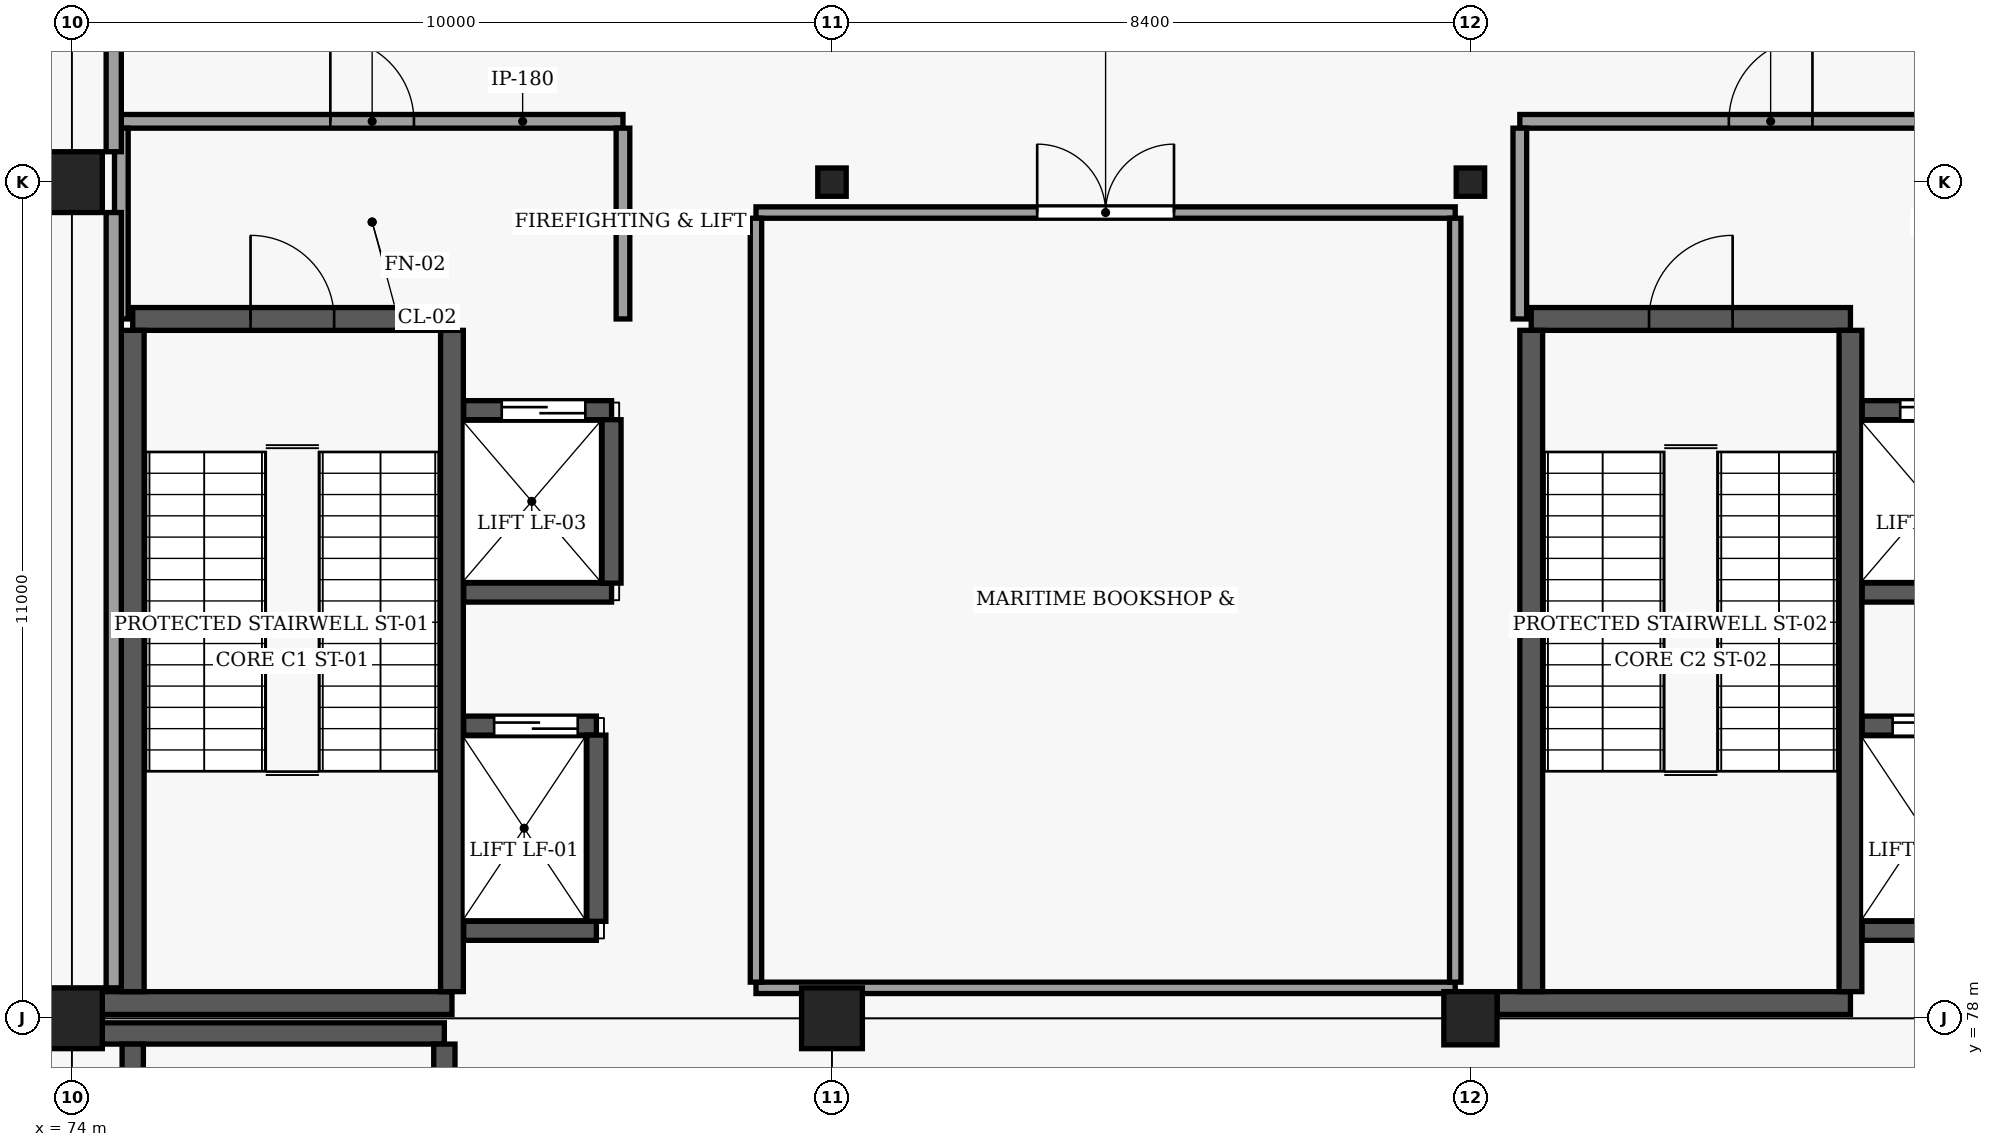
"""IFC4 building model, lengths in metres.
Left out: names, types, materials, properties, quantities, classifications, styles, units other than length and angle.
Written with IfcOpenShell. Run it as: python <this file> out.ifc"""

import sys

from ifc_helpers import new_model, si_unit, direction, frame, frame_2d, origin, origin_2d, place, context, subcontext, project, spatial, rectangle, i_section, extrude, element, fill, save


model = new_model("IFC4")
c1 = context("Model", 3, precision=1e-05, world=origin(), true_north=direction((0.0, 1.0)))
c2 = subcontext(c1, "Body", "Model", "MODEL_VIEW")
j1 = project(units=[si_unit("LENGTHUNIT", "METRE"), si_unit("PLANEANGLEUNIT", "RADIAN")], contexts=[c1])
p1 = place(None, origin())
s1 = spatial("IfcSite", under=j1, at=p1, CompositionType="ELEMENT")
p2 = place(p1, origin())
s2 = spatial("IfcBuilding", under=s1, at=p2, CompositionType="ELEMENT")
p3 = place(p2, origin())
s3 = spatial("IfcBuildingStorey", under=s2, at=p3, CompositionType="ELEMENT", Elevation=0.0)
for number, where, z_axis, x_axis in (
    (1, (74.0, 78.0, -0.45), (0.0, 0.0, 1.0), (1.0, 0.0, 0.0)),
    (2, (84.0, 78.0, -0.45), (0.0, 0.0, 1.0), (1.0, 0.0, 0.0)),
):
    element("IfcColumn", number, at=place(p3, frame(where, z_axis=z_axis, x_axis=x_axis)), inside=s3, PredefinedType="COLUMN", context=c2, shape_type="SweptSolid", body=[
        extrude(rectangle(XDim=0.8, YDim=0.8, at=origin_2d()), origin(), (0.0, 0.0, 1.0), 5.57),
    ])
p4 = place(p3, frame((92.4, 78.0, -0.45), z_axis=(0.0, 0.0, 1.0), x_axis=(1.0, 0.0, 0.0)))
e3 = element("IfcColumn", 3, at=p4, inside=s3, PredefinedType="COLUMN", context=c2, shape_type="SweptSolid", body=[
    extrude(rectangle(XDim=0.7, YDim=0.7, at=origin_2d()), origin(), (0.0, 0.0, 1.0), 5.57),
])
p5 = place(p3, frame((74.0, 89.0, -0.45), z_axis=(0.0, 0.0, 1.0), x_axis=(1.0, 0.0, 0.0)))
e4 = element("IfcColumn", 4, at=p5, inside=s3, PredefinedType="COLUMN", context=c2, shape_type="SweptSolid", body=[
    extrude(rectangle(XDim=0.8, YDim=0.8, at=origin_2d()), origin(), (0.0, 0.0, 1.0), 5.57),
])
for number, where, z_axis, x_axis in (
    (5, (84.0, 89.0, -0.45), (0.0, 0.0, 1.0), (1.0, 0.0, 0.0)),
    (6, (92.4, 89.0, -0.45), (0.0, 0.0, 1.0), (1.0, 0.0, 0.0)),
):
    element("IfcColumn", number, at=place(p3, frame(where, z_axis=z_axis, x_axis=x_axis)), inside=s3, PredefinedType="COLUMN", context=c2, shape_type="SweptSolid", body=[
        extrude(i_section(OverallWidth=0.374, OverallDepth=0.372, WebThickness=0.016, FlangeThickness=0.026, FilletRadius=0.016, at=origin_2d()), origin(), (0.0, 0.0, 1.0), 5.57),
    ])
p6 = place(p3, frame((74.4, 78.2, -0.45), z_axis=(0.0, 0.0, 1.0), x_axis=(1.0, 0.0, 0.0)))
e7 = element("IfcWall", 7, at=p6, inside=s3, PredefinedType="SHEAR", context=c2, shape_type="SweptSolid", body=[
    extrude(rectangle(XDim=4.6, YDim=0.3, at=frame_2d((2.3, 0.0))), origin(), (0.0, 0.0, 1.0), 5.57),
])
p7 = place(p3, frame((74.8, 87.2, -0.45), z_axis=(0.0, 0.0, 1.0), x_axis=(1.0, 0.0, 0.0)))
e8 = element("IfcWall", 8, at=p7, inside=s3, PredefinedType="SHEAR", context=c2, shape_type="SweptSolid", body=[
    extrude(rectangle(XDim=4.2, YDim=0.3, at=frame_2d((2.1, 0.0))), origin(), (0.0, 0.0, 1.0), 5.57),
])
p8 = place(p7, frame((1.55, 0.0, 0.45)))
e9 = element("IfcOpeningElement", 9, at=p8, cuts=e8, PredefinedType="OPENING", context=c2, shape_type="SweptSolid", body=[
    extrude(rectangle(XDim=1.1, YDim=2.2, at=frame_2d((0.55, 1.1))), frame((0.0, 0.16, 0.0), z_axis=(0.0, -1.0, 0.0), x_axis=(1.0, 0.0, 0.0)), (0.0, 0.0, 1.0), 0.32),
])
for number, where, z_axis, x_axis in (
    (10, (74.8, 78.35, -0.45), (0.0, 0.0, 1.0), (0.0, 1.0, 0.0)),
    (11, (79.0, 78.35, -0.45), (0.0, 0.0, 1.0), (0.0, 1.0, 0.0)),
):
    element("IfcWall", number, at=place(p3, frame(where, z_axis=z_axis, x_axis=x_axis)), inside=s3, PredefinedType="SHEAR", context=c2, shape_type="SweptSolid", body=[
        extrude(rectangle(XDim=8.7, YDim=0.3, at=frame_2d((4.35, 0.0))), origin(), (0.0, 0.0, 1.0), 5.57),
    ])
p9 = place(p3, frame((79.155, 79.15, -1.6), z_axis=(0.0, 0.0, 1.0), x_axis=(1.0, 0.0, 0.0)))
e12 = element("IfcWall", 12, at=p9, inside=s3, PredefinedType="SOLIDWALL", context=c2, shape_type="SweptSolid", body=[
    extrude(rectangle(XDim=1.745, YDim=0.25, at=frame_2d((0.873, 0.0))), origin(), (0.0, 0.0, 1.0), 6.72),
])
p10 = place(p3, frame((79.155, 81.85, -1.6), z_axis=(0.0, 0.0, 1.0), x_axis=(1.0, 0.0, 0.0)))
e13 = element("IfcWall", 13, at=p10, inside=s3, PredefinedType="SOLIDWALL", context=c2, shape_type="SweptSolid", body=[
    extrude(rectangle(XDim=1.745, YDim=0.25, at=frame_2d((0.873, 0.0))), origin(), (0.0, 0.0, 1.0), 6.72),
])
p11 = place(p10, frame((0.4, 0.0, 1.6)))
e14 = element("IfcOpeningElement", 14, at=p11, cuts=e13, PredefinedType="OPENING", context=c2, shape_type="SweptSolid", body=[
    extrude(rectangle(XDim=1.1, YDim=2.2, at=frame_2d((0.55, 1.1))), frame((0.0, 0.135, 0.0), z_axis=(0.0, -1.0, 0.0), x_axis=(1.0, 0.0, 0.0)), (0.0, 0.0, 1.0), 0.27),
])
p12 = place(p3, frame((80.9, 79.275, -1.6), z_axis=(0.0, 0.0, 1.0), x_axis=(0.0, 1.0, 0.0)))
e15 = element("IfcWall", 15, at=p12, inside=s3, PredefinedType="SOLIDWALL", context=c2, shape_type="SweptSolid", body=[
    extrude(rectangle(XDim=2.45, YDim=0.25, at=frame_2d((1.225, 0.0))), origin(), (0.0, 0.0, 1.0), 6.72),
])
p13 = place(p3, frame((79.155, 83.6, -1.6), z_axis=(0.0, 0.0, 1.0), x_axis=(1.0, 0.0, 0.0)))
e16 = element("IfcWall", 16, at=p13, inside=s3, PredefinedType="SOLIDWALL", context=c2, shape_type="SweptSolid", body=[
    extrude(rectangle(XDim=1.945, YDim=0.25, at=frame_2d((0.973, 0.0))), origin(), (0.0, 0.0, 1.0), 6.72),
])
p14 = place(p3, frame((79.155, 86.0, -1.6), z_axis=(0.0, 0.0, 1.0), x_axis=(1.0, 0.0, 0.0)))
e17 = element("IfcWall", 17, at=p14, inside=s3, PredefinedType="SOLIDWALL", context=c2, shape_type="SweptSolid", body=[
    extrude(rectangle(XDim=1.945, YDim=0.25, at=frame_2d((0.973, 0.0))), origin(), (0.0, 0.0, 1.0), 6.72),
])
p15 = place(p14, frame((0.5, 0.0, 1.6)))
e18 = element("IfcOpeningElement", 18, at=p15, cuts=e17, PredefinedType="OPENING", context=c2, shape_type="SweptSolid", body=[
    extrude(rectangle(XDim=1.1, YDim=2.2, at=frame_2d((0.55, 1.1))), frame((0.0, 0.135, 0.0), z_axis=(0.0, -1.0, 0.0), x_axis=(1.0, 0.0, 0.0)), (0.0, 0.0, 1.0), 0.27),
])
p16 = place(p3, frame((81.1, 83.725, -1.6), z_axis=(0.0, 0.0, 1.0), x_axis=(0.0, 1.0, 0.0)))
e19 = element("IfcWall", 19, at=p16, inside=s3, PredefinedType="SOLIDWALL", context=c2, shape_type="SweptSolid", body=[
    extrude(rectangle(XDim=2.15, YDim=0.25, at=frame_2d((1.075, 0.0))), origin(), (0.0, 0.0, 1.0), 6.72),
])
p17 = place(p3, frame((92.75, 78.2, -0.45), z_axis=(0.0, 0.0, 1.0), x_axis=(1.0, 0.0, 0.0)))
e20 = element("IfcWall", 20, at=p17, inside=s3, PredefinedType="SHEAR", context=c2, shape_type="SweptSolid", body=[
    extrude(rectangle(XDim=4.65, YDim=0.3, at=frame_2d((2.325, 0.0))), origin(), (0.0, 0.0, 1.0), 5.57),
])
p18 = place(p3, frame((93.2, 87.2, -0.45), z_axis=(0.0, 0.0, 1.0), x_axis=(1.0, 0.0, 0.0)))
e21 = element("IfcWall", 21, at=p18, inside=s3, PredefinedType="SHEAR", context=c2, shape_type="SweptSolid", body=[
    extrude(rectangle(XDim=4.2, YDim=0.3, at=frame_2d((2.1, 0.0))), origin(), (0.0, 0.0, 1.0), 5.57),
])
p19 = place(p18, frame((1.55, 0.0, 0.45)))
e22 = element("IfcOpeningElement", 22, at=p19, cuts=e21, PredefinedType="OPENING", context=c2, shape_type="SweptSolid", body=[
    extrude(rectangle(XDim=1.1, YDim=2.2, at=frame_2d((0.55, 1.1))), frame((0.0, 0.16, 0.0), z_axis=(0.0, -1.0, 0.0), x_axis=(1.0, 0.0, 0.0)), (0.0, 0.0, 1.0), 0.32),
])
for number, where, z_axis, x_axis in (
    (23, (93.2, 78.35, -0.45), (0.0, 0.0, 1.0), (0.0, 1.0, 0.0)),
    (24, (97.4, 78.35, -0.45), (0.0, 0.0, 1.0), (0.0, 1.0, 0.0)),
):
    element("IfcWall", number, at=place(p3, frame(where, z_axis=z_axis, x_axis=x_axis)), inside=s3, PredefinedType="SHEAR", context=c2, shape_type="SweptSolid", body=[
        extrude(rectangle(XDim=8.7, YDim=0.3, at=frame_2d((4.35, 0.0))), origin(), (0.0, 0.0, 1.0), 5.57),
    ])
p20 = place(p3, frame((97.555, 79.15, -1.6), z_axis=(0.0, 0.0, 1.0), x_axis=(1.0, 0.0, 0.0)))
e25 = element("IfcWall", 25, at=p20, inside=s3, PredefinedType="SOLIDWALL", context=c2, shape_type="SweptSolid", body=[
    extrude(rectangle(XDim=1.745, YDim=0.25, at=frame_2d((0.873, 0.0))), origin(), (0.0, 0.0, 1.0), 6.72),
])
p21 = place(p3, frame((97.555, 81.85, -1.6), z_axis=(0.0, 0.0, 1.0), x_axis=(1.0, 0.0, 0.0)))
e26 = element("IfcWall", 26, at=p21, inside=s3, PredefinedType="SOLIDWALL", context=c2, shape_type="SweptSolid", body=[
    extrude(rectangle(XDim=1.745, YDim=0.25, at=frame_2d((0.873, 0.0))), origin(), (0.0, 0.0, 1.0), 6.72),
])
p22 = place(p21, frame((0.4, 0.0, 1.6)))
e27 = element("IfcOpeningElement", 27, at=p22, cuts=e26, PredefinedType="OPENING", context=c2, shape_type="SweptSolid", body=[
    extrude(rectangle(XDim=1.1, YDim=2.2, at=frame_2d((0.55, 1.1))), frame((0.0, 0.135, 0.0), z_axis=(0.0, -1.0, 0.0), x_axis=(1.0, 0.0, 0.0)), (0.0, 0.0, 1.0), 0.27),
])
p23 = place(p3, frame((97.555, 83.6, -1.6), z_axis=(0.0, 0.0, 1.0), x_axis=(1.0, 0.0, 0.0)))
e28 = element("IfcWall", 28, at=p23, inside=s3, PredefinedType="SOLIDWALL", context=c2, shape_type="SweptSolid", body=[
    extrude(rectangle(XDim=1.945, YDim=0.25, at=frame_2d((0.973, 0.0))), origin(), (0.0, 0.0, 1.0), 6.72),
])
p24 = place(p3, frame((97.555, 86.0, -1.6), z_axis=(0.0, 0.0, 1.0), x_axis=(1.0, 0.0, 0.0)))
e29 = element("IfcWall", 29, at=p24, inside=s3, PredefinedType="SOLIDWALL", context=c2, shape_type="SweptSolid", body=[
    extrude(rectangle(XDim=1.945, YDim=0.25, at=frame_2d((0.973, 0.0))), origin(), (0.0, 0.0, 1.0), 6.72),
])
p25 = place(p24, frame((0.5, 0.0, 1.6)))
e30 = element("IfcOpeningElement", 30, at=p25, cuts=e29, PredefinedType="OPENING", context=c2, shape_type="SweptSolid", body=[
    extrude(rectangle(XDim=1.1, YDim=2.2, at=frame_2d((0.55, 1.1))), frame((0.0, 0.135, 0.0), z_axis=(0.0, -1.0, 0.0), x_axis=(1.0, 0.0, 0.0)), (0.0, 0.0, 1.0), 0.27),
])
p26 = place(p3, frame((74.4, 77.8, -0.45), z_axis=(0.0, 0.0, 1.0), x_axis=(1.0, 0.0, 0.0)))
e31 = element("IfcWall", 31, at=p26, inside=s3, PredefinedType="SHEAR", context=c2, shape_type="SweptSolid", body=[
    extrude(rectangle(XDim=4.5, YDim=0.28, at=frame_2d((2.25, 0.0))), origin(), (0.0, 0.0, 1.0), 5.57),
])
for number, where, z_axis, x_axis in (
    (32, (74.8, 68.94, -0.45), (0.0, 0.0, 1.0), (0.0, 1.0, 0.0)),
    (33, (78.9, 68.94, -0.45), (0.0, 0.0, 1.0), (0.0, 1.0, 0.0)),
):
    element("IfcWall", number, at=place(p3, frame(where, z_axis=z_axis, x_axis=x_axis)), inside=s3, PredefinedType="SHEAR", context=c2, shape_type="SweptSolid", body=[
        extrude(rectangle(XDim=8.72, YDim=0.28, at=frame_2d((4.36, 0.0))), origin(), (0.0, 0.0, 1.0), 5.57),
    ])
p27 = place(p3, frame((74.65, 89.8, 0.0), z_axis=(0.0, 0.0, 1.0), x_axis=(1.0, 0.0, 0.0)))
e34 = element("IfcWall", 34, at=p27, inside=s3, PredefinedType="SOLIDWALL", context=c2, shape_type="SweptSolid", body=[
    extrude(rectangle(XDim=6.6, YDim=0.18, at=frame_2d((3.3, 0.0))), origin(), (0.0, 0.0, 1.0), 5.1),
])
p28 = place(p27, frame((2.75, 0.0, 0.0)))
e35 = element("IfcOpeningElement", 35, at=p28, cuts=e34, PredefinedType="OPENING", context=c2, shape_type="SweptSolid", body=[
    extrude(rectangle(XDim=1.1, YDim=2.2, at=frame_2d((0.55, 1.1))), frame((0.0, 0.1, 0.0), z_axis=(0.0, -1.0, 0.0), x_axis=(1.0, 0.0, 0.0)), (0.0, 0.0, 1.0), 0.2),
])
for number, where, z_axis, x_axis in (
    (36, (74.65, 87.2, 0.0), (0.0, 0.0, 1.0), (0.0, 1.0, 0.0)),
    (37, (81.25, 87.2, 0.0), (0.0, 0.0, 1.0), (0.0, 1.0, 0.0)),
):
    element("IfcWall", number, at=place(p3, frame(where, z_axis=z_axis, x_axis=x_axis)), inside=s3, PredefinedType="SOLIDWALL", context=c2, shape_type="SweptSolid", body=[
        extrude(rectangle(XDim=2.51, YDim=0.18, at=frame_2d((1.255, 0.0))), origin(), (0.0, 0.0, 1.0), 4.66),
    ])
p29 = place(p3, frame((93.05, 89.8, 0.0), z_axis=(0.0, 0.0, 1.0), x_axis=(1.0, 0.0, 0.0)))
e38 = element("IfcWall", 38, at=p29, inside=s3, PredefinedType="SOLIDWALL", context=c2, shape_type="SweptSolid", body=[
    extrude(rectangle(XDim=6.6, YDim=0.18, at=frame_2d((3.3, 0.0))), origin(), (0.0, 0.0, 1.0), 5.1),
])
p30 = place(p29, frame((2.75, 0.0, 0.0)))
e39 = element("IfcOpeningElement", 39, at=p30, cuts=e38, PredefinedType="OPENING", context=c2, shape_type="SweptSolid", body=[
    extrude(rectangle(XDim=1.1, YDim=2.2, at=frame_2d((0.55, 1.1))), frame((0.0, 0.1, 0.0), z_axis=(0.0, -1.0, 0.0), x_axis=(1.0, 0.0, 0.0)), (0.0, 0.0, 1.0), 0.2),
])
p31 = place(p3, frame((93.05, 87.2, 0.0), z_axis=(0.0, 0.0, 1.0), x_axis=(0.0, 1.0, 0.0)))
e40 = element("IfcWall", 40, at=p31, inside=s3, PredefinedType="SOLIDWALL", context=c2, shape_type="SweptSolid", body=[
    extrude(rectangle(XDim=2.51, YDim=0.18, at=frame_2d((1.255, 0.0))), origin(), (0.0, 0.0, 1.0), 4.66),
])
p32 = place(p3, frame((74.55, 78.4, 0.0), z_axis=(0.0, 0.0, 1.0), x_axis=(0.0, 1.0, 0.0)))
e41 = element("IfcWall", 41, at=p32, inside=s3, PredefinedType="SOLIDWALL", context=c2, shape_type="SweptSolid", body=[
    extrude(rectangle(XDim=10.2, YDim=0.2, at=frame_2d((5.1, 0.0))), origin(), (0.0, 0.0, 1.0), 5.12),
])
p33 = place(p3, frame((74.55, 89.4, 0.0), z_axis=(0.0, 0.0, 1.0), x_axis=(0.0, 1.0, 0.0)))
e42 = element("IfcWall", 42, at=p33, inside=s3, PredefinedType="SOLIDWALL", context=c2, shape_type="SweptSolid", body=[
    extrude(rectangle(XDim=10.2, YDim=0.2, at=frame_2d((5.1, 0.0))), origin(), (0.0, 0.0, 1.0), 4.807),
])
p34 = place(p33, frame((4.1, 0.0, 0.0)))
e43 = element("IfcOpeningElement", 43, at=p34, cuts=e42, PredefinedType="OPENING", context=c2, shape_type="SweptSolid", body=[
    extrude(rectangle(XDim=1.8, YDim=2.2, at=frame_2d((0.9, 1.1))), frame((0.0, 0.11, 0.0), z_axis=(0.0, -1.0, 0.0), x_axis=(1.0, 0.0, 0.0)), (0.0, 0.0, 1.0), 0.22),
])
p35 = place(p3, frame((83.0, 78.4, 0.0), z_axis=(0.0, 0.0, 1.0), x_axis=(1.0, 0.0, 0.0)))
e44 = element("IfcWall", 44, at=p35, inside=s3, PredefinedType="PARTITIONING", context=c2, shape_type="SweptSolid", body=[
    extrude(rectangle(XDim=9.2, YDim=0.15, at=frame_2d((4.6, 0.0))), origin(), (0.0, 0.0, 1.0), 4.703),
])
p36 = place(p3, frame((83.0, 88.6, 0.0), z_axis=(0.0, 0.0, 1.0), x_axis=(1.0, 0.0, 0.0)))
e45 = element("IfcWall", 45, at=p36, inside=s3, PredefinedType="PARTITIONING", context=c2, shape_type="SweptSolid", body=[
    extrude(rectangle(XDim=9.2, YDim=0.15, at=frame_2d((4.6, 0.0))), origin(), (0.0, 0.0, 1.0), 4.703),
])
p37 = place(p36, frame((3.7, 0.0, 0.0)))
e46 = element("IfcOpeningElement", 46, at=p37, cuts=e45, PredefinedType="OPENING", context=c2, shape_type="SweptSolid", body=[
    extrude(rectangle(XDim=1.8, YDim=2.3, at=frame_2d((0.9, 1.15))), frame((0.0, 0.085, 0.0), z_axis=(0.0, -1.0, 0.0), x_axis=(1.0, 0.0, 0.0)), (0.0, 0.0, 1.0), 0.17),
])
p38 = place(p3, frame((83.0, 78.475, 0.0), z_axis=(0.0, 0.0, 1.0), x_axis=(0.0, 1.0, 0.0)))
e47 = element("IfcWall", 47, at=p38, inside=s3, PredefinedType="PARTITIONING", context=c2, shape_type="SweptSolid", body=[
    extrude(rectangle(XDim=10.05, YDim=0.15, at=frame_2d((5.025, 0.0))), origin(), (0.0, 0.0, 1.0), 5.1),
])
p39 = place(p3, frame((92.2, 78.475, 0.0), z_axis=(0.0, 0.0, 1.0), x_axis=(0.0, 1.0, 0.0)))
e48 = element("IfcWall", 48, at=p39, inside=s3, PredefinedType="PARTITIONING", context=c2, shape_type="SweptSolid", body=[
    extrude(rectangle(XDim=10.05, YDim=0.15, at=frame_2d((5.025, 0.0))), origin(), (0.0, 0.0, 1.0), 4.703),
])
p40 = place(p8, origin())
e49 = element("IfcDoor", 49, at=p40, inside=s3, OperationType="SINGLE_SWING_LEFT", PredefinedType="DOOR", context=c2, shape_type="SweptSolid", body=[
    extrude(rectangle(XDim=1.1, YDim=2.2, at=frame_2d((0.55, 1.1))), frame((0.0, 0.025, 0.0), z_axis=(0.0, -1.0, 0.0), x_axis=(1.0, 0.0, 0.0)), (0.0, 0.0, 1.0), 0.05),
])
fill(e9, e49)
p41 = place(p11, origin())
e50 = element("IfcDoor", 50, at=p41, inside=s3, OperationType="SLIDING_TO_LEFT", PredefinedType="DOOR", context=c2, shape_type="SweptSolid", body=[
    extrude(rectangle(XDim=1.1, YDim=2.2, at=frame_2d((0.55, 1.1))), frame((0.0, 0.025, 0.0), z_axis=(0.0, -1.0, 0.0), x_axis=(1.0, 0.0, 0.0)), (0.0, 0.0, 1.0), 0.05),
])
fill(e14, e50)
p42 = place(p15, origin())
e51 = element("IfcDoor", 51, at=p42, inside=s3, OperationType="SLIDING_TO_LEFT", PredefinedType="DOOR", context=c2, shape_type="SweptSolid", body=[
    extrude(rectangle(XDim=1.1, YDim=2.2, at=frame_2d((0.55, 1.1))), frame((0.0, 0.025, 0.0), z_axis=(0.0, -1.0, 0.0), x_axis=(1.0, 0.0, 0.0)), (0.0, 0.0, 1.0), 0.05),
])
fill(e18, e51)
p43 = place(p19, origin())
e52 = element("IfcDoor", 52, at=p43, inside=s3, OperationType="SINGLE_SWING_RIGHT", PredefinedType="DOOR", context=c2, shape_type="SweptSolid", body=[
    extrude(rectangle(XDim=1.1, YDim=2.2, at=frame_2d((0.55, 1.1))), frame((0.0, 0.025, 0.0), z_axis=(0.0, -1.0, 0.0), x_axis=(1.0, 0.0, 0.0)), (0.0, 0.0, 1.0), 0.05),
])
fill(e22, e52)
p44 = place(p22, origin())
e53 = element("IfcDoor", 53, at=p44, inside=s3, OperationType="SLIDING_TO_LEFT", PredefinedType="DOOR", context=c2, shape_type="SweptSolid", body=[
    extrude(rectangle(XDim=1.1, YDim=2.2, at=frame_2d((0.55, 1.1))), frame((0.0, 0.025, 0.0), z_axis=(0.0, -1.0, 0.0), x_axis=(1.0, 0.0, 0.0)), (0.0, 0.0, 1.0), 0.05),
])
fill(e27, e53)
p45 = place(p25, origin())
e54 = element("IfcDoor", 54, at=p45, inside=s3, OperationType="SLIDING_TO_LEFT", PredefinedType="DOOR", context=c2, shape_type="SweptSolid", body=[
    extrude(rectangle(XDim=1.1, YDim=2.2, at=frame_2d((0.55, 1.1))), frame((0.0, 0.025, 0.0), z_axis=(0.0, -1.0, 0.0), x_axis=(1.0, 0.0, 0.0)), (0.0, 0.0, 1.0), 0.05),
])
fill(e30, e54)
p46 = place(p28, origin())
e55 = element("IfcDoor", 55, at=p46, inside=s3, OperationType="SINGLE_SWING_LEFT", PredefinedType="DOOR", context=c2, shape_type="SweptSolid", body=[
    extrude(rectangle(XDim=1.1, YDim=2.2, at=frame_2d((0.55, 1.1))), frame((0.0, 0.025, 0.0), z_axis=(0.0, -1.0, 0.0), x_axis=(1.0, 0.0, 0.0)), (0.0, 0.0, 1.0), 0.05),
])
fill(e35, e55)
p47 = place(p30, origin())
e56 = element("IfcDoor", 56, at=p47, inside=s3, OperationType="SINGLE_SWING_RIGHT", PredefinedType="DOOR", context=c2, shape_type="SweptSolid", body=[
    extrude(rectangle(XDim=1.1, YDim=2.2, at=frame_2d((0.55, 1.1))), frame((0.0, 0.025, 0.0), z_axis=(0.0, -1.0, 0.0), x_axis=(1.0, 0.0, 0.0)), (0.0, 0.0, 1.0), 0.05),
])
fill(e39, e56)
p48 = place(p37, origin())
e57 = element("IfcDoor", 57, at=p48, inside=s3, OperationType="DOUBLE_DOOR_SINGLE_SWING", PredefinedType="DOOR", context=c2, shape_type="SweptSolid", body=[
    extrude(rectangle(XDim=1.8, YDim=2.3, at=frame_2d((0.9, 1.15))), frame((0.0, 0.025, 0.0), z_axis=(0.0, -1.0, 0.0), x_axis=(1.0, 0.0, 0.0)), (0.0, 0.0, 1.0), 0.05),
])
fill(e46, e57)
save(model, sys.argv[1])
